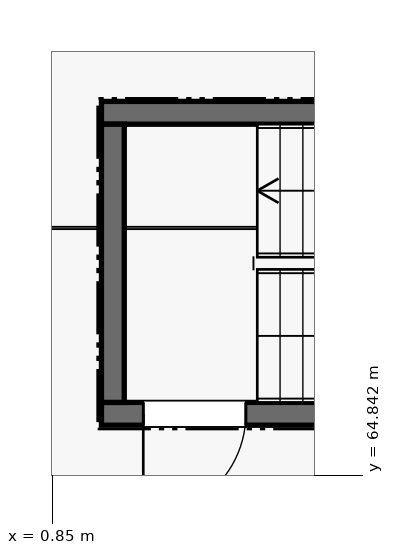
"""IFC4 building model, lengths in metres.
Left out: names, types, materials, properties, quantities, classifications, styles, units other than length and angle.
Written with IfcOpenShell. Run it as: python <this file> out.ifc"""

import sys

from ifc_helpers import new_model, si_unit, direction, frame, frame_2d, origin, place, context, subcontext, project, spatial, rectangle, extrude, element, fill, save


model = new_model("IFC4")
c1 = context("Model", 3, precision=1e-05, world=origin(), true_north=direction((0.0, 1.0)))
c2 = subcontext(c1, "Body", "Model", "MODEL_VIEW")
j1 = project(units=[si_unit("LENGTHUNIT", "METRE"), si_unit("PLANEANGLEUNIT", "RADIAN")], contexts=[c1])
p1 = place(None, origin())
s1 = spatial("IfcSite", under=j1, at=p1, CompositionType="ELEMENT")
p2 = place(p1, origin())
s2 = spatial("IfcBuilding", under=s1, at=p2, CompositionType="ELEMENT")
p3 = place(p2, origin())
s3 = spatial("IfcBuildingStorey", under=s2, at=p3, CompositionType="ELEMENT", Elevation=0.0)
p4 = place(p3, frame((1.5, 65.65, 0.0), z_axis=(0.0, 0.0, 1.0), x_axis=(1.0, 0.0, 0.0)))
e1 = element("IfcWall", 1, at=p4, inside=s3, PredefinedType="SHEAR", context=c2, shape_type="SweptSolid", body=[
    extrude(rectangle(XDim=8.65, YDim=0.3, at=frame_2d((4.325, 0.0))), origin(), (0.0, 0.0, 1.0), 5.1),
])
p5 = place(p4, frame((0.55, 0.0, 0.0)))
e2 = element("IfcOpeningElement", 2, at=p5, cuts=e1, PredefinedType="OPENING", context=c2, shape_type="SweptSolid", body=[
    extrude(rectangle(XDim=1.35, YDim=2.2, at=frame_2d((0.675, 1.1))), frame((0.0, 0.16, 0.0), z_axis=(0.0, -1.0, 0.0), x_axis=(1.0, 0.0, 0.0)), (0.0, 0.0, 1.0), 0.32),
])
p6 = place(p3, frame((10.15, 69.61, 0.0), z_axis=(0.0, 0.0, 1.0), x_axis=(-1.0, 0.0, 0.0)))
e3 = element("IfcWall", 3, at=p6, inside=s3, PredefinedType="SHEAR", context=c2, shape_type="SweptSolid", body=[
    extrude(rectangle(XDim=8.65, YDim=0.3, at=frame_2d((4.325, 0.0))), origin(), (0.0, 0.0, 1.0), 5.1),
])
p7 = place(p3, frame((1.65, 69.46, 0.0), z_axis=(0.0, 0.0, 1.0), x_axis=(0.0, -1.0, 0.0)))
e4 = element("IfcWall", 4, at=p7, inside=s3, PredefinedType="SHEAR", context=c2, shape_type="SweptSolid", body=[
    extrude(rectangle(XDim=3.66, YDim=0.3, at=frame_2d((1.83, 0.0))), origin(), (0.0, 0.0, 1.0), 5.1),
])
p8 = place(p5, frame((1.35, 0.0, 0.0), z_axis=(0.0, 0.0, 1.0), x_axis=(-1.0, 0.0, 0.0)))
e5 = element("IfcDoor", 5, at=p8, inside=s3, OperationType="SINGLE_SWING_RIGHT", PredefinedType="DOOR", context=c2, shape_type="SweptSolid", body=[
    extrude(rectangle(XDim=1.35, YDim=2.2, at=frame_2d((0.675, 1.1))), frame((0.0, 0.025, 0.0), z_axis=(0.0, -1.0, 0.0), x_axis=(1.0, 0.0, 0.0)), (0.0, 0.0, 1.0), 0.05),
])
fill(e2, e5)
save(model, sys.argv[1])
